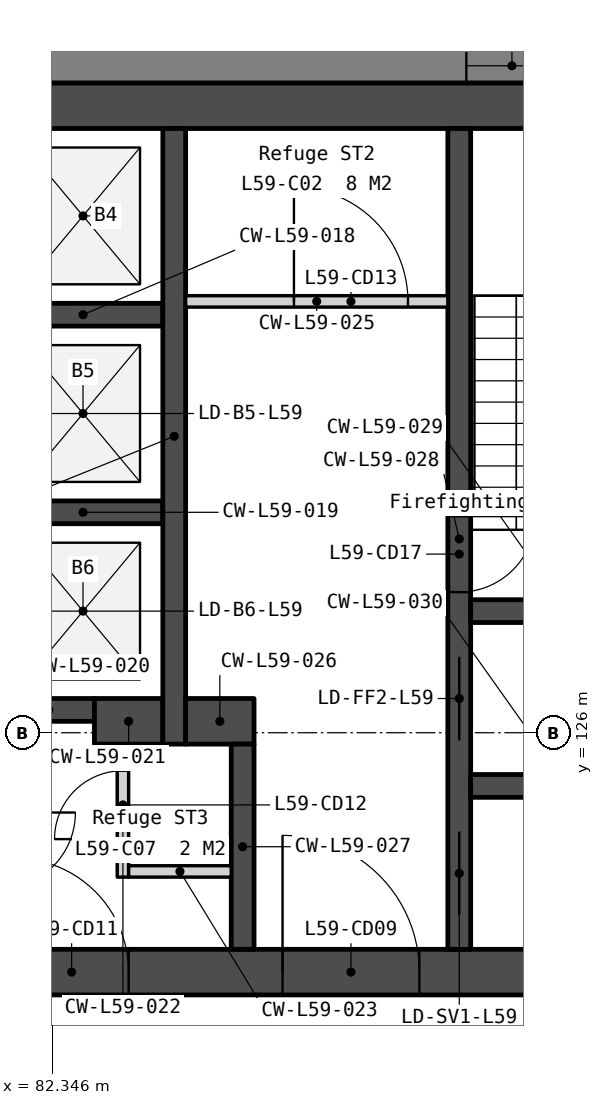
"""IFC4 building model, lengths in metres.
Left out: names, types, materials, properties, quantities, classifications, styles, units other than length and angle.
Written with IfcOpenShell. Run it as: python <this file> out.ifc"""

import sys

from ifc_helpers import new_model, si_unit, direction, frame, frame_2d, origin, place, context, subcontext, project, spatial, polyline, rectangle, outline, extrude, element, fill, save


model = new_model("IFC4")
c1 = context("Model", 3, precision=1e-05, world=origin(), true_north=direction((0.0, 1.0)))
c2 = subcontext(c1, "Body", "Model", "MODEL_VIEW")
j1 = project(units=[si_unit("LENGTHUNIT", "METRE"), si_unit("PLANEANGLEUNIT", "RADIAN")], contexts=[c1])
p1 = place(None, origin())
s1 = spatial("IfcSite", under=j1, at=p1, CompositionType="ELEMENT")
p2 = place(p1, origin())
s2 = spatial("IfcBuilding", under=s1, at=p2, CompositionType="ELEMENT")
p3 = place(p2, frame((0.0, 0.0, 242.6)))
s3 = spatial("IfcBuildingStorey", under=s2, at=p3, CompositionType="ELEMENT", Elevation=242.6)
p4 = place(p3, frame((69.0, 134.25, 0.0), z_axis=(0.0, 0.0, 1.0), x_axis=(1.0, 0.0, 0.0)))
e1 = element("IfcWall", 1, at=p4, inside=s3, PredefinedType="SOLIDWALL", context=c2, shape_type="SweptSolid", body=[
    extrude(rectangle(XDim=22.0, YDim=0.6, at=frame_2d((11.0, 0.0))), origin(), (0.0, 0.0, 1.0), 3.75),
])
p5 = place(p3, frame((69.0, 122.85, 0.0), z_axis=(0.0, 0.0, 1.0), x_axis=(1.0, 0.0, 0.0)))
e2 = element("IfcWall", 2, at=p5, inside=s3, PredefinedType="SOLIDWALL", context=c2, shape_type="SweptSolid", body=[
    extrude(rectangle(XDim=22.0, YDim=0.6, at=frame_2d((11.0, 0.0))), origin(), (0.0, 0.0, 1.0), 3.75),
])
p6 = place(p5, frame((16.375, 0.0, 0.0)))
e3 = element("IfcOpeningElement", 3, at=p6, cuts=e2, PredefinedType="OPENING", context=c2, shape_type="SweptSolid", body=[
    extrude(rectangle(XDim=1.8, YDim=2.1, at=frame_2d((0.9, 1.05))), frame((0.0, 0.31, 0.0), z_axis=(0.0, -1.0, 0.0), x_axis=(1.0, 0.0, 0.0)), (0.0, 0.0, 1.0), 0.62),
])
p7 = place(p5, frame((3.825, 0.0, 0.0)))
e4 = element("IfcOpeningElement", 4, at=p7, cuts=e2, PredefinedType="OPENING", context=c2, shape_type="SweptSolid", body=[
    extrude(rectangle(XDim=1.8, YDim=2.1, at=frame_2d((0.9, 1.05))), frame((0.0, 0.31, 0.0), z_axis=(0.0, -1.0, 0.0), x_axis=(1.0, 0.0, 0.0)), (0.0, 0.0, 1.0), 0.62),
])
p8 = place(p5, frame((12.85, 0.0, 0.0)))
e5 = element("IfcOpeningElement", 5, at=p8, cuts=e2, PredefinedType="OPENING", context=c2, shape_type="SweptSolid", body=[
    extrude(rectangle(XDim=1.5, YDim=2.1, at=frame_2d((0.75, 1.05))), frame((0.0, 0.31, 0.0), z_axis=(0.0, -1.0, 0.0), x_axis=(1.0, 0.0, 0.0)), (0.0, 0.0, 1.0), 0.62),
])
for number, where, z_axis, x_axis in (
    (6, (81.7, 131.5, 0.0), (0.0, 0.0, 1.0), (1.0, 0.0, 0.0)),
    (7, (81.7, 128.9, 0.0), (0.0, 0.0, 1.0), (1.0, 0.0, 0.0)),
):
    element("IfcWall", number, at=place(p3, frame(where, z_axis=z_axis, x_axis=x_axis)), inside=s3, PredefinedType="SOLIDWALL", context=c2, shape_type="SweptSolid", body=[
        extrude(rectangle(XDim=2.1, YDim=0.3, at=frame_2d((1.05, 0.0))), origin(), (0.0, 0.0, 1.0), 3.75),
    ])
p9 = place(p3, frame((81.7, 126.3, 0.0), z_axis=(0.0, 0.0, 1.0), x_axis=(1.0, 0.0, 0.0)))
e8 = element("IfcWall", 8, at=p9, inside=s3, PredefinedType="SOLIDWALL", context=c2, shape_type="SweptSolid", body=[
    extrude(rectangle(XDim=1.2, YDim=0.3, at=frame_2d((0.6, 0.0))), origin(), (0.0, 0.0, 1.0), 3.75),
])
p10 = place(p3, frame((82.9, 126.15, 0.0), z_axis=(0.0, 0.0, 1.0), x_axis=(1.0, 0.0, 0.0)))
e9 = element("IfcWall", 9, at=p10, inside=s3, PredefinedType="SOLIDWALL", context=c2, shape_type="SweptSolid", body=[
    extrude(rectangle(XDim=0.9, YDim=0.6, at=frame_2d((0.45, 0.0))), origin(), (0.0, 0.0, 1.0), 3.75),
])
p11 = place(p3, frame((83.275, 125.85, 0.0), z_axis=(0.0, 0.0, 1.0), x_axis=(0.0, -1.0, 0.0)))
e10 = element("IfcWall", 10, at=p11, inside=s3, PredefinedType="PARTITIONING", context=c2, shape_type="SweptSolid", body=[
    extrude(rectangle(XDim=1.75, YDim=0.15, at=frame_2d((0.875, 0.0))), origin(), (0.0, 0.0, 1.0), 3.75),
])
p12 = place(p11, frame((0.35, 0.0, 0.0)))
e11 = element("IfcOpeningElement", 11, at=p12, cuts=e10, PredefinedType="OPENING", context=c2, shape_type="SweptSolid", body=[
    extrude(rectangle(XDim=0.9, YDim=2.1, at=frame_2d((0.45, 1.05))), frame((0.0, 0.085, 0.0), z_axis=(0.0, -1.0, 0.0), x_axis=(1.0, 0.0, 0.0)), (0.0, 0.0, 1.0), 0.17),
])
p13 = place(p3, frame((83.35, 124.175, 0.0), z_axis=(0.0, 0.0, 1.0), x_axis=(1.0, 0.0, 0.0)))
e12 = element("IfcWall", 12, at=p13, inside=s3, PredefinedType="PARTITIONING", context=c2, shape_type="SweptSolid", body=[
    extrude(rectangle(XDim=1.35, YDim=0.15, at=frame_2d((0.675, 0.0))), origin(), (0.0, 0.0, 1.0), 3.75),
])
p14 = place(p3, frame((83.95, 133.95, 0.0), z_axis=(0.0, 0.0, 1.0), x_axis=(0.0, -1.0, 0.0)))
e13 = element("IfcWall", 13, at=p14, inside=s3, PredefinedType="SOLIDWALL", context=c2, shape_type="SweptSolid", body=[
    extrude(rectangle(XDim=8.1, YDim=0.3, at=frame_2d((4.05, 0.0))), origin(), (0.0, 0.0, 1.0), 3.75),
])
p15 = place(p3, frame((84.1, 131.675, 0.0), z_axis=(0.0, 0.0, 1.0), x_axis=(1.0, 0.0, 0.0)))
e14 = element("IfcWall", 14, at=p15, inside=s3, PredefinedType="PARTITIONING", context=c2, shape_type="SweptSolid", body=[
    extrude(rectangle(XDim=3.45, YDim=0.15, at=frame_2d((1.725, 0.0))), origin(), (0.0, 0.0, 1.0), 3.75),
])
p16 = place(p15, frame((1.425, 0.0, 0.0)))
e15 = element("IfcOpeningElement", 15, at=p16, cuts=e14, PredefinedType="OPENING", context=c2, shape_type="SweptSolid", body=[
    extrude(rectangle(XDim=1.5, YDim=2.1, at=frame_2d((0.75, 1.05))), frame((0.0, 0.085, 0.0), z_axis=(0.0, -1.0, 0.0), x_axis=(1.0, 0.0, 0.0)), (0.0, 0.0, 1.0), 0.17),
])
p17 = place(p3, frame((84.1, 126.15, 0.0), z_axis=(0.0, 0.0, 1.0), x_axis=(1.0, 0.0, 0.0)))
e16 = element("IfcWall", 16, at=p17, inside=s3, PredefinedType="SOLIDWALL", context=c2, shape_type="SweptSolid", body=[
    extrude(rectangle(XDim=0.9, YDim=0.6, at=frame_2d((0.45, 0.0))), origin(), (0.0, 0.0, 1.0), 3.75),
])
p18 = place(p3, frame((84.85, 125.85, 0.0), z_axis=(0.0, 0.0, 1.0), x_axis=(0.0, -1.0, 0.0)))
e17 = element("IfcWall", 17, at=p18, inside=s3, PredefinedType="SOLIDWALL", context=c2, shape_type="SweptSolid", body=[
    extrude(rectangle(XDim=2.7, YDim=0.3, at=frame_2d((1.35, 0.0))), origin(), (0.0, 0.0, 1.0), 3.75),
])
p19 = place(p3, frame((87.7, 133.95, 0.0), z_axis=(0.0, 0.0, 1.0), x_axis=(0.0, -1.0, 0.0)))
e18 = element("IfcWall", 18, at=p19, inside=s3, PredefinedType="SOLIDWALL", context=c2, shape_type="SweptSolid", body=[
    extrude(rectangle(XDim=10.8, YDim=0.3, at=frame_2d((5.4, 0.0))), origin(), (0.0, 0.0, 1.0), 3.75),
])
p20 = place(p19, frame((6.95, 0.0, 0.0)))
e19 = element("IfcOpeningElement", 19, at=p20, cuts=e18, PredefinedType="OPENING", context=c2, shape_type="SweptSolid", body=[
    extrude(rectangle(XDim=1.1, YDim=2.1, at=frame_2d((0.55, 1.05))), frame((0.0, 0.16, 0.0), z_axis=(0.0, -1.0, 0.0), x_axis=(1.0, 0.0, 0.0)), (0.0, 0.0, 1.0), 0.32),
])
p21 = place(p19, frame((5.1, 0.0, 0.0)))
e20 = element("IfcOpeningElement", 20, at=p21, cuts=e18, PredefinedType="OPENING", context=c2, shape_type="SweptSolid", body=[
    extrude(rectangle(XDim=1.0, YDim=2.1, at=frame_2d((0.5, 1.05))), frame((0.0, 0.16, 0.0), z_axis=(0.0, -1.0, 0.0), x_axis=(1.0, 0.0, 0.0)), (0.0, 0.0, 1.0), 0.32),
])
p22 = place(p19, frame((9.25, 0.0, 0.0)))
e21 = element("IfcOpeningElement", 21, at=p22, cuts=e18, PredefinedType="OPENING", context=c2, shape_type="SweptSolid", body=[
    extrude(rectangle(XDim=1.1, YDim=2.1, at=frame_2d((0.55, 1.05))), frame((0.0, 0.16, 0.0), z_axis=(0.0, -1.0, 0.0), x_axis=(1.0, 0.0, 0.0)), (0.0, 0.0, 1.0), 0.32),
])
for number, where, z_axis, x_axis in (
    (22, (87.85, 127.6, 0.0), (0.0, 0.0, 1.0), (1.0, 0.0, 0.0)),
    (23, (87.85, 125.3, 0.0), (0.0, 0.0, 1.0), (1.0, 0.0, 0.0)),
):
    element("IfcWall", number, at=place(p3, frame(where, z_axis=z_axis, x_axis=x_axis)), inside=s3, PredefinedType="SOLIDWALL", context=c2, shape_type="SweptSolid", body=[
        extrude(rectangle(XDim=2.55, YDim=0.3, at=frame_2d((1.275, 0.0))), origin(), (0.0, 0.0, 1.0), 3.75),
    ])
p23 = place(p3, frame((98.486, 134.775, -0.15), z_axis=(0.0, 0.0, 1.0), x_axis=(-1.0, 0.0, 0.0)))
e24 = element("IfcWall", 24, at=p23, inside=s3, PredefinedType="SOLIDWALL", context=c2, shape_type="SweptSolid", body=[
    extrude(outline(polyline([(36.972, 0.0), (36.972, 3.9), (0.0, 3.9), (0.0, 0.0), (36.972, 0.0)])), frame((0.0, 0.225, 0.0), z_axis=(0.0, -1.0, 0.0), x_axis=(1.0, 0.0, 0.0)), (0.0, 0.0, 1.0), 0.45),
])
p24 = place(p23, frame((0.715, 0.0, 0.95)))
e25 = element("IfcOpeningElement", 25, at=p24, cuts=e24, PredefinedType="OPENING", context=c2, shape_type="SweptSolid", body=[
    extrude(rectangle(XDim=1.2, YDim=2.2, at=frame_2d((0.6, 1.1))), frame((0.0, 0.235, 0.0), z_axis=(0.0, -1.0, 0.0), x_axis=(1.0, 0.0, 0.0)), (0.0, 0.0, 1.0), 0.47),
])
p25 = place(p23, frame((7.793, 0.0, 0.95)))
e26 = element("IfcOpeningElement", 26, at=p25, cuts=e24, PredefinedType="OPENING", context=c2, shape_type="SweptSolid", body=[
    extrude(rectangle(XDim=1.2, YDim=2.2, at=frame_2d((0.6, 1.1))), frame((0.0, 0.235, 0.0), z_axis=(0.0, -1.0, 0.0), x_axis=(1.0, 0.0, 0.0)), (0.0, 0.0, 1.0), 0.47),
])
p26 = place(p23, frame((9.493, 0.0, 0.95)))
e27 = element("IfcOpeningElement", 27, at=p26, cuts=e24, PredefinedType="OPENING", context=c2, shape_type="SweptSolid", body=[
    extrude(rectangle(XDim=1.2, YDim=2.2, at=frame_2d((0.6, 1.1))), frame((0.0, 0.235, 0.0), z_axis=(0.0, -1.0, 0.0), x_axis=(1.0, 0.0, 0.0)), (0.0, 0.0, 1.0), 0.47),
])
p27 = place(p23, frame((17.036, 0.0, 0.95)))
e28 = element("IfcOpeningElement", 28, at=p27, cuts=e24, PredefinedType="OPENING", context=c2, shape_type="SweptSolid", body=[
    extrude(rectangle(XDim=1.2, YDim=2.2, at=frame_2d((0.6, 1.1))), frame((0.0, 0.235, 0.0), z_axis=(0.0, -1.0, 0.0), x_axis=(1.0, 0.0, 0.0)), (0.0, 0.0, 1.0), 0.47),
])
p28 = place(p23, frame((18.736, 0.0, 0.95)))
e29 = element("IfcOpeningElement", 29, at=p28, cuts=e24, PredefinedType="OPENING", context=c2, shape_type="SweptSolid", body=[
    extrude(rectangle(XDim=1.2, YDim=2.2, at=frame_2d((0.6, 1.1))), frame((0.0, 0.235, 0.0), z_axis=(0.0, -1.0, 0.0), x_axis=(1.0, 0.0, 0.0)), (0.0, 0.0, 1.0), 0.47),
])
p29 = place(p23, frame((26.279, 0.0, 0.95)))
e30 = element("IfcOpeningElement", 30, at=p29, cuts=e24, PredefinedType="OPENING", context=c2, shape_type="SweptSolid", body=[
    extrude(rectangle(XDim=1.2, YDim=2.2, at=frame_2d((0.6, 1.1))), frame((0.0, 0.235, 0.0), z_axis=(0.0, -1.0, 0.0), x_axis=(1.0, 0.0, 0.0)), (0.0, 0.0, 1.0), 0.47),
])
p30 = place(p23, frame((27.979, 0.0, 0.95)))
e31 = element("IfcOpeningElement", 31, at=p30, cuts=e24, PredefinedType="OPENING", context=c2, shape_type="SweptSolid", body=[
    extrude(rectangle(XDim=1.2, YDim=2.2, at=frame_2d((0.6, 1.1))), frame((0.0, 0.235, 0.0), z_axis=(0.0, -1.0, 0.0), x_axis=(1.0, 0.0, 0.0)), (0.0, 0.0, 1.0), 0.47),
])
p31 = place(p23, frame((35.058, 0.0, 0.95)))
e32 = element("IfcOpeningElement", 32, at=p31, cuts=e24, PredefinedType="OPENING", context=c2, shape_type="SweptSolid", body=[
    extrude(rectangle(XDim=1.2, YDim=2.2, at=frame_2d((0.6, 1.1))), frame((0.0, 0.235, 0.0), z_axis=(0.0, -1.0, 0.0), x_axis=(1.0, 0.0, 0.0)), (0.0, 0.0, 1.0), 0.47),
])
p32 = place(p3, frame((80.905, 101.188, -0.15), z_axis=(0.0, 0.0, 1.0), x_axis=(0.500002536638, 0.866023939251, 0.0)))
e33 = element("IfcWall", 33, at=p32, inside=s3, PredefinedType="SOLIDWALL", context=c2, shape_type="SweptSolid", body=[
    extrude(outline(polyline([(36.972, 0.0), (36.972, 3.9), (0.0, 3.9), (0.0, 0.0), (36.972, 0.0)])), frame((0.0, 0.225, 0.0), z_axis=(0.0, -1.0, 0.0), x_axis=(1.0, 0.0, 0.0)), (0.0, 0.0, 1.0), 0.45),
])
p33 = place(p32, frame((0.715, 0.0, 0.95)))
e34 = element("IfcOpeningElement", 34, at=p33, cuts=e33, PredefinedType="OPENING", context=c2, shape_type="SweptSolid", body=[
    extrude(rectangle(XDim=1.2, YDim=2.2, at=frame_2d((0.6, 1.1))), frame((0.0, 0.235, 0.0), z_axis=(0.0, -1.0, 0.0), x_axis=(1.0, 0.0, 0.0)), (0.0, 0.0, 1.0), 0.47),
])
p34 = place(p32, frame((7.793, 0.0, 0.95)))
e35 = element("IfcOpeningElement", 35, at=p34, cuts=e33, PredefinedType="OPENING", context=c2, shape_type="SweptSolid", body=[
    extrude(rectangle(XDim=1.2, YDim=2.2, at=frame_2d((0.6, 1.1))), frame((0.0, 0.235, 0.0), z_axis=(0.0, -1.0, 0.0), x_axis=(1.0, 0.0, 0.0)), (0.0, 0.0, 1.0), 0.47),
])
p35 = place(p32, frame((9.493, 0.0, 0.95)))
e36 = element("IfcOpeningElement", 36, at=p35, cuts=e33, PredefinedType="OPENING", context=c2, shape_type="SweptSolid", body=[
    extrude(rectangle(XDim=1.2, YDim=2.2, at=frame_2d((0.6, 1.1))), frame((0.0, 0.235, 0.0), z_axis=(0.0, -1.0, 0.0), x_axis=(1.0, 0.0, 0.0)), (0.0, 0.0, 1.0), 0.47),
])
p36 = place(p32, frame((17.036, 0.0, 0.95)))
e37 = element("IfcOpeningElement", 37, at=p36, cuts=e33, PredefinedType="OPENING", context=c2, shape_type="SweptSolid", body=[
    extrude(rectangle(XDim=1.2, YDim=2.2, at=frame_2d((0.6, 1.1))), frame((0.0, 0.235, 0.0), z_axis=(0.0, -1.0, 0.0), x_axis=(1.0, 0.0, 0.0)), (0.0, 0.0, 1.0), 0.47),
])
p37 = place(p32, frame((18.736, 0.0, 0.95)))
e38 = element("IfcOpeningElement", 38, at=p37, cuts=e33, PredefinedType="OPENING", context=c2, shape_type="SweptSolid", body=[
    extrude(rectangle(XDim=1.2, YDim=2.2, at=frame_2d((0.6, 1.1))), frame((0.0, 0.235, 0.0), z_axis=(0.0, -1.0, 0.0), x_axis=(1.0, 0.0, 0.0)), (0.0, 0.0, 1.0), 0.47),
])
p38 = place(p32, frame((26.279, 0.0, 0.95)))
e39 = element("IfcOpeningElement", 39, at=p38, cuts=e33, PredefinedType="OPENING", context=c2, shape_type="SweptSolid", body=[
    extrude(rectangle(XDim=1.2, YDim=2.2, at=frame_2d((0.6, 1.1))), frame((0.0, 0.235, 0.0), z_axis=(0.0, -1.0, 0.0), x_axis=(1.0, 0.0, 0.0)), (0.0, 0.0, 1.0), 0.47),
])
p39 = place(p32, frame((27.979, 0.0, 0.95)))
e40 = element("IfcOpeningElement", 40, at=p39, cuts=e33, PredefinedType="OPENING", context=c2, shape_type="SweptSolid", body=[
    extrude(rectangle(XDim=1.2, YDim=2.2, at=frame_2d((0.6, 1.1))), frame((0.0, 0.235, 0.0), z_axis=(0.0, -1.0, 0.0), x_axis=(1.0, 0.0, 0.0)), (0.0, 0.0, 1.0), 0.47),
])
p40 = place(p32, frame((35.058, 0.0, 0.95)))
e41 = element("IfcOpeningElement", 41, at=p40, cuts=e33, PredefinedType="OPENING", context=c2, shape_type="SweptSolid", body=[
    extrude(rectangle(XDim=1.2, YDim=2.2, at=frame_2d((0.6, 1.1))), frame((0.0, 0.235, 0.0), z_axis=(0.0, -1.0, 0.0), x_axis=(1.0, 0.0, 0.0)), (0.0, 0.0, 1.0), 0.47),
])
p41 = place(p20, origin())
e42 = element("IfcDoor", 42, at=p41, inside=s3, OperationType="SLIDING_TO_LEFT", PredefinedType="DOOR", context=c2, shape_type="SweptSolid", body=[
    extrude(rectangle(XDim=1.1, YDim=2.1, at=frame_2d((0.55, 1.05))), frame((0.0, 0.025, 0.0), z_axis=(0.0, -1.0, 0.0), x_axis=(1.0, 0.0, 0.0)), (0.0, 0.0, 1.0), 0.05),
])
fill(e19, e42)
p42 = place(p6, origin())
e43 = element("IfcDoor", 43, at=p42, inside=s3, OperationType="DOUBLE_DOOR_DOUBLE_SWING", PredefinedType="DOOR", context=c2, shape_type="SweptSolid", body=[
    extrude(rectangle(XDim=1.8, YDim=2.1, at=frame_2d((0.9, 1.05))), frame((0.0, 0.025, 0.0), z_axis=(0.0, -1.0, 0.0), x_axis=(1.0, 0.0, 0.0)), (0.0, 0.0, 1.0), 0.05),
])
fill(e3, e43)
p43 = place(p8, origin())
e44 = element("IfcDoor", 44, at=p43, inside=s3, OperationType="DOUBLE_DOOR_DOUBLE_SWING", PredefinedType="DOOR", context=c2, shape_type="SweptSolid", body=[
    extrude(rectangle(XDim=1.5, YDim=2.1, at=frame_2d((0.75, 1.05))), frame((0.0, 0.025, 0.0), z_axis=(0.0, -1.0, 0.0), x_axis=(1.0, 0.0, 0.0)), (0.0, 0.0, 1.0), 0.05),
])
fill(e5, e44)
p44 = place(p12, origin())
e45 = element("IfcDoor", 45, at=p44, inside=s3, OperationType="SINGLE_SWING_RIGHT", PredefinedType="DOOR", context=c2, shape_type="SweptSolid", body=[
    extrude(rectangle(XDim=0.9, YDim=2.1, at=frame_2d((0.45, 1.05))), frame((0.0, 0.025, 0.0), z_axis=(0.0, -1.0, 0.0), x_axis=(1.0, 0.0, 0.0)), (0.0, 0.0, 1.0), 0.05),
])
fill(e11, e45)
p45 = place(p16, origin())
e46 = element("IfcDoor", 46, at=p45, inside=s3, OperationType="DOUBLE_DOOR_DOUBLE_SWING", PredefinedType="DOOR", context=c2, shape_type="SweptSolid", body=[
    extrude(rectangle(XDim=1.5, YDim=2.1, at=frame_2d((0.75, 1.05))), frame((0.0, 0.025, 0.0), z_axis=(0.0, -1.0, 0.0), x_axis=(1.0, 0.0, 0.0)), (0.0, 0.0, 1.0), 0.05),
])
fill(e15, e46)
p46 = place(p21, origin())
e47 = element("IfcDoor", 47, at=p46, inside=s3, OperationType="SINGLE_SWING_LEFT", PredefinedType="DOOR", context=c2, shape_type="SweptSolid", body=[
    extrude(rectangle(XDim=1.0, YDim=2.1, at=frame_2d((0.5, 1.05))), frame((0.0, 0.025, 0.0), z_axis=(0.0, -1.0, 0.0), x_axis=(1.0, 0.0, 0.0)), (0.0, 0.0, 1.0), 0.05),
])
fill(e20, e47)
p47 = place(p22, origin())
e48 = element("IfcDoor", 48, at=p47, inside=s3, OperationType="SLIDING_TO_LEFT", PredefinedType="DOOR", context=c2, shape_type="SweptSolid", body=[
    extrude(rectangle(XDim=1.1, YDim=2.1, at=frame_2d((0.55, 1.05))), frame((0.0, 0.025, 0.0), z_axis=(0.0, -1.0, 0.0), x_axis=(1.0, 0.0, 0.0)), (0.0, 0.0, 1.0), 0.05),
])
fill(e21, e48)
p48 = place(p26, origin())
e49 = element("IfcWindow", 49, at=p48, inside=s3, PartitioningType="SINGLE_PANEL", PredefinedType="WINDOW", context=c2, shape_type="SweptSolid", body=[
    extrude(rectangle(XDim=1.2, YDim=2.2, at=frame_2d((0.6, 1.1))), frame((0.0, 0.03, 0.0), z_axis=(0.0, -1.0, 0.0), x_axis=(1.0, 0.0, 0.0)), (0.0, 0.0, 1.0), 0.06),
])
fill(e27, e49)
save(model, sys.argv[1])
